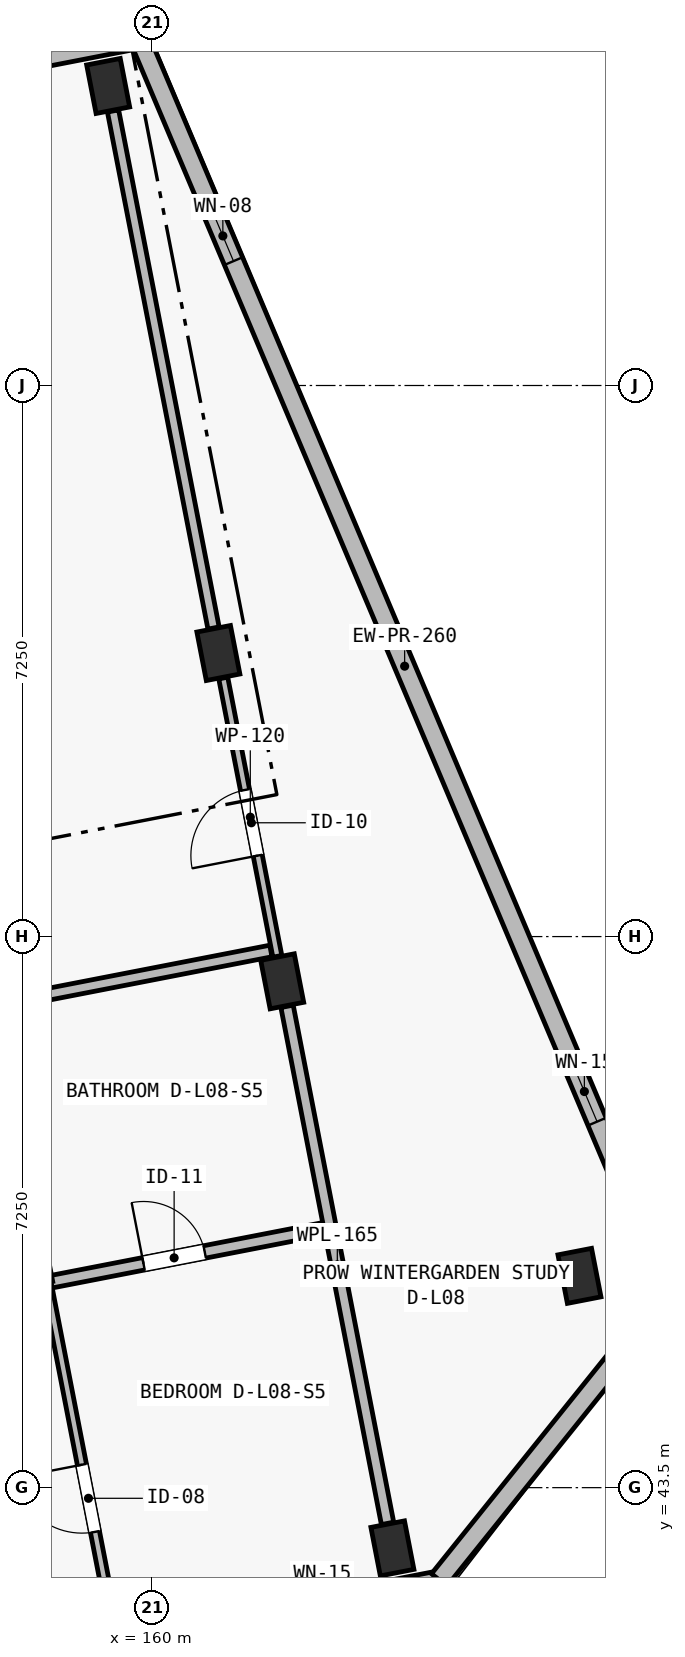
"""IFC4 building model, lengths in metres.
Left out: names, types, materials, properties, quantities, classifications, styles, units other than length and angle.
Written with IfcOpenShell. Run it as: python <this file> out.ifc"""

import sys

from ifc_helpers import new_model, si_unit, direction, frame, frame_2d, origin, origin_2d, place, context, subcontext, project, spatial, polyline, rectangle, outline, extrude, element, fill, save


model = new_model("IFC4")
c1 = context("Model", 3, precision=1e-05, world=origin(), true_north=direction((0.0, 1.0)))
c2 = subcontext(c1, "Body", "Model", "MODEL_VIEW")
j1 = project(units=[si_unit("LENGTHUNIT", "METRE"), si_unit("PLANEANGLEUNIT", "RADIAN")], contexts=[c1])
p1 = place(None, origin())
s1 = spatial("IfcSite", under=j1, at=p1, CompositionType="ELEMENT")
p2 = place(p1, origin())
s2 = spatial("IfcBuilding", under=s1, at=p2, CompositionType="ELEMENT")
p3 = place(p2, frame((0.0, 0.0, 27.9)))
s3 = spatial("IfcBuildingStorey", under=s2, at=p3, CompositionType="ELEMENT", Elevation=27.9)
for number, where, z_axis, x_axis in (
    (1, (163.162, 42.701, 0.0), (0.0, 0.0, 1.0), (0.982, 0.191, 0.0)),
    (2, (161.712, 50.161, 0.0), (0.0, 0.0, 1.0), (0.982, 0.191, 0.0)),
    (3, (160.873, 54.48, 0.0), (0.0, 0.0, 1.0), (0.982, 0.191, 0.0)),
    (4, (159.422, 61.941, 0.0), (0.0, 0.0, 1.0), (0.982, 0.191, 0.0)),
):
    element("IfcColumn", number, at=place(p3, frame(where, z_axis=z_axis, x_axis=x_axis)), inside=s3, PredefinedType="COLUMN", context=c2, shape_type="SweptSolid", body=[
        extrude(rectangle(XDim=0.45, YDim=0.65, at=origin_2d()), origin(), (0.0, 0.0, 1.0), 7.468),
    ])
p4 = place(p3, frame((165.623, 46.286, 0.0), z_axis=(0.0, 0.0, 1.0), x_axis=(0.981627183448, 0.190808995377, 0.0)))
e5 = element("IfcColumn", 5, at=p4, inside=s3, PredefinedType="COLUMN", context=c2, shape_type="SweptSolid", body=[
    extrude(rectangle(XDim=0.45, YDim=0.65, at=origin_2d()), origin(), (0.0, 0.0, 1.0), 8.139),
])
p5 = place(p3, frame((163.778, 42.286, 0.0), z_axis=(0.0, 0.0, 1.0), x_axis=(-0.981628367112, -0.190802905848, 0.0)))
e6 = element("IfcWall", 6, at=p5, inside=s3, PredefinedType="SOLIDWALL", context=c2, shape_type="SweptSolid", body=[
    extrude(outline(polyline([(0.0, 0.0), (8.125, 0.0), (8.125, 6.56), (0.0, 8.241), (0.0, 0.0)])), frame((0.0, 0.12, 0.0), z_axis=(0.0, -1.0, 0.0), x_axis=(1.0, 0.0, 0.0)), (0.0, 0.0, 1.0), 0.24),
])
p6 = place(p5, frame((1.135, 0.0, 0.48)))
e7 = element("IfcOpeningElement", 7, at=p6, cuts=e6, PredefinedType="OPENING", context=c2, shape_type="SweptSolid", body=[
    extrude(rectangle(XDim=0.86, YDim=2.36, at=frame_2d((0.43, 1.18))), frame((0.0, 0.135, 0.0), z_axis=(0.0, -1.0, 0.0), x_axis=(1.0, 0.0, 0.0)), (0.0, 0.0, 1.0), 0.27),
])
p7 = place(p5, frame((2.697, 0.0, 0.52)))
e8 = element("IfcOpeningElement", 8, at=p7, cuts=e6, PredefinedType="OPENING", context=c2, shape_type="SweptSolid", body=[
    extrude(rectangle(XDim=0.58, YDim=2.16, at=frame_2d((0.29, 1.08))), frame((0.0, 0.135, 0.0), z_axis=(0.0, -1.0, 0.0), x_axis=(1.0, 0.0, 0.0)), (0.0, 0.0, 1.0), 0.27),
])
p8 = place(p5, frame((6.43, 0.0, 0.48)))
e9 = element("IfcOpeningElement", 9, at=p8, cuts=e6, PredefinedType="OPENING", context=c2, shape_type="SweptSolid", body=[
    extrude(rectangle(XDim=0.62, YDim=2.28, at=frame_2d((0.31, 1.14))), frame((0.0, 0.135, 0.0), z_axis=(0.0, -1.0, 0.0), x_axis=(1.0, 0.0, 0.0)), (0.0, 0.0, 1.0), 0.27),
])
p9 = place(p3, frame((151.862, 61.006, 0.0), z_axis=(0.0, 0.0, 1.0), x_axis=(0.981627273155, 0.190808533872, 0.0)))
e10 = element("IfcWall", 10, at=p9, inside=s3, PredefinedType="SOLIDWALL", context=c2, shape_type="SweptSolid", body=[
    extrude(outline(polyline([(0.0, 0.0), (8.125, 0.0), (8.125, 8.241), (0.0, 6.56), (0.0, 0.0)])), frame((0.0, 0.12, 0.0), z_axis=(0.0, -1.0, 0.0), x_axis=(1.0, 0.0, 0.0)), (0.0, 0.0, 1.0), 0.24),
])
p10 = place(p3, frame((159.837, 62.556, 0.0), z_axis=(0.0, 0.0, 1.0), x_axis=(0.389225507936, -0.921142499276, 0.0)))
e11 = element("IfcWall", 11, at=p10, inside=s3, PredefinedType="SOLIDWALL", context=c2, shape_type="SweptSolid", body=[
    extrude(outline(polyline([(0.0, 0.0), (17.91, 0.0), (17.91, 9.006), (0.0, 8.241), (0.0, 0.0)])), frame((0.0, 0.13, 0.0), z_axis=(0.0, -1.0, 0.0), x_axis=(1.0, 0.0, 0.0)), (0.0, 0.0, 1.0), 0.26),
])
p11 = place(p10, frame((2.45, 0.0, 0.45)))
e12 = element("IfcOpeningElement", 12, at=p11, cuts=e11, PredefinedType="OPENING", context=c2, shape_type="SweptSolid", body=[
    extrude(rectangle(XDim=0.72, YDim=2.16, at=frame_2d((0.36, 1.08))), frame((0.0, 0.145, 0.0), z_axis=(0.0, -1.0, 0.0), x_axis=(1.0, 0.0, 0.0)), (0.0, 0.0, 1.0), 0.29),
])
p12 = place(p10, frame((14.6, 0.0, 0.52)))
e13 = element("IfcOpeningElement", 13, at=p12, cuts=e11, PredefinedType="OPENING", context=c2, shape_type="SweptSolid", body=[
    extrude(rectangle(XDim=0.86, YDim=2.36, at=frame_2d((0.43, 1.18))), frame((0.0, 0.145, 0.0), z_axis=(0.0, -1.0, 0.0), x_axis=(1.0, 0.0, 0.0)), (0.0, 0.0, 1.0), 0.29),
])
p13 = place(p3, frame((166.809, 46.058, 0.0), z_axis=(0.0, 0.0, 1.0), x_axis=(-0.626281072923, -0.779597343312, 0.0)))
e14 = element("IfcWall", 14, at=p13, inside=s3, PredefinedType="SOLIDWALL", context=c2, shape_type="SweptSolid", body=[
    extrude(outline(polyline([(0.0, 0.0), (4.839, 0.0), (4.839, 8.241), (0.0, 9.006), (0.0, 0.0)])), frame((0.0, 0.13, 0.0), z_axis=(0.0, -1.0, 0.0), x_axis=(1.0, 0.0, 0.0)), (0.0, 0.0, 1.0), 0.26),
])
p14 = place(p3, frame((161.648, 50.49, 0.0), z_axis=(0.0, 0.0, 1.0), x_axis=(-0.190789073686, 0.981631055622, 0.0)))
e15 = element("IfcWall", 15, at=p14, inside=s3, PredefinedType="PARTITIONING", context=c2, shape_type="SweptSolid", body=[
    extrude(rectangle(XDim=3.73, YDim=0.12, at=frame_2d((1.865, 0.0))), origin(), (0.0, 0.0, 1.0), 2.6),
])
p15 = place(p14, frame((1.35, 0.0, 0.0)))
e16 = element("IfcOpeningElement", 16, at=p15, cuts=e15, PredefinedType="OPENING", context=c2, shape_type="SweptSolid", body=[
    extrude(rectangle(XDim=0.88, YDim=2.1, at=frame_2d((0.44, 1.05))), frame((0.0, 0.075, 0.0), z_axis=(0.0, -1.0, 0.0), x_axis=(1.0, 0.0, 0.0)), (0.0, 0.0, 1.0), 0.15),
])
p16 = place(p3, frame((160.809, 54.809, 0.0), z_axis=(0.0, 0.0, 1.0), x_axis=(-0.190808365525, 0.981627305878, 0.0)))
e17 = element("IfcWall", 17, at=p16, inside=s3, PredefinedType="PARTITIONING", context=c2, shape_type="SweptSolid", body=[
    extrude(rectangle(XDim=6.93, YDim=0.15, at=frame_2d((3.465, 0.0))), origin(), (0.0, 0.0, 1.0), 2.6),
])
p17 = place(p3, frame((163.098, 43.03, 0.0), z_axis=(0.0, 0.0, 1.0), x_axis=(-0.190835713385, 0.981621989616, 0.0)))
e18 = element("IfcWall", 18, at=p17, inside=s3, PredefinedType="PLUMBINGWALL", context=c2, shape_type="SweptSolid", body=[
    extrude(rectangle(XDim=6.93, YDim=0.165, at=frame_2d((3.465, 0.0))), origin(), (0.0, 0.0, 1.0), 2.6),
])
p18 = place(p3, frame((154.402, 49.168, 0.0), z_axis=(0.0, 0.0, 1.0), x_axis=(0.981623226858, 0.190829349137, 0.0)))
e19 = element("IfcWall", 19, at=p18, inside=s3, PredefinedType="PARTITIONING", context=c2, shape_type="SweptSolid", body=[
    extrude(rectangle(XDim=7.295, YDim=0.155, at=frame_2d((3.647, 0.0))), origin(), (0.0, 0.0, 1.0), 3.15),
])
p19 = place(p18, frame((1.355, 0.0, 0.0)))
e20 = element("IfcOpeningElement", 20, at=p19, cuts=e19, PredefinedType="OPENING", context=c2, shape_type="SweptSolid", body=[
    extrude(rectangle(XDim=0.98, YDim=2.15, at=frame_2d((0.49, 1.075))), frame((0.0, 0.093, 0.0), z_axis=(0.0, -1.0, 0.0), x_axis=(1.0, 0.0, 0.0)), (0.0, 0.0, 1.0), 0.185),
])
p20 = place(p3, frame((158.612, 46.197, 0.0), z_axis=(0.0, 0.0, 1.0), x_axis=(0.981621896267, 0.190836193549, 0.0)))
e21 = element("IfcWall", 21, at=p20, inside=s3, PredefinedType="PLUMBINGWALL", context=c2, shape_type="SweptSolid", body=[
    extrude(rectangle(XDim=3.71, YDim=0.165, at=frame_2d((1.855, 0.0))), origin(), (0.0, 0.0, 1.0), 3.15),
])
p21 = place(p20, frame((1.3, 0.0, 0.0)))
e22 = element("IfcOpeningElement", 22, at=p21, cuts=e21, PredefinedType="OPENING", context=c2, shape_type="SweptSolid", body=[
    extrude(rectangle(XDim=0.82, YDim=2.08, at=frame_2d((0.41, 1.04))), frame((0.0, 0.097, 0.0), z_axis=(0.0, -1.0, 0.0), x_axis=(1.0, 0.0, 0.0)), (0.0, 0.0, 1.0), 0.195),
])
p22 = place(p3, frame((159.506, 41.593, 0.0), z_axis=(0.0, 0.0, 1.0), x_axis=(-0.190787451574, 0.981631370893, 0.0)))
e23 = element("IfcWall", 23, at=p22, inside=s3, PredefinedType="PARTITIONING", context=c2, shape_type="SweptSolid", body=[
    extrude(rectangle(XDim=4.69, YDim=0.12, at=frame_2d((2.345, 0.0))), origin(), (0.0, 0.0, 1.0), 3.15),
])
p23 = place(p22, frame((1.35, 0.0, 0.0)))
e24 = element("IfcOpeningElement", 24, at=p23, cuts=e23, PredefinedType="OPENING", context=c2, shape_type="SweptSolid", body=[
    extrude(rectangle(XDim=0.9, YDim=2.1, at=frame_2d((0.45, 1.05))), frame((0.0, 0.075, 0.0), z_axis=(0.0, -1.0, 0.0), x_axis=(1.0, 0.0, 0.0)), (0.0, 0.0, 1.0), 0.15),
])
p24 = place(p3, frame((158.612, 46.197, 0.0), z_axis=(0.0, 0.0, 1.0), x_axis=(-0.190850336204, 0.981619146701, 0.0)))
e25 = element("IfcWall", 25, at=p24, inside=s3, PredefinedType="PLUMBINGWALL", context=c2, shape_type="SweptSolid", body=[
    extrude(rectangle(XDim=3.72, YDim=0.165, at=frame_2d((1.86, 0.0))), origin(), (0.0, 0.0, 1.0), 3.15),
])
p25 = place(p11, origin())
e26 = element("IfcWindow", 26, at=p25, inside=s3, PartitioningType="SINGLE_PANEL", PredefinedType="WINDOW", context=c2, shape_type="SweptSolid", body=[
    extrude(rectangle(XDim=0.72, YDim=2.16, at=frame_2d((0.36, 1.08))), frame((0.0, 0.03, 0.0), z_axis=(0.0, -1.0, 0.0), x_axis=(1.0, 0.0, 0.0)), (0.0, 0.0, 1.0), 0.06),
])
fill(e12, e26)
p26 = place(p12, origin())
e27 = element("IfcWindow", 27, at=p26, inside=s3, PartitioningType="SINGLE_PANEL", PredefinedType="WINDOW", context=c2, shape_type="SweptSolid", body=[
    extrude(rectangle(XDim=0.86, YDim=2.36, at=frame_2d((0.43, 1.18))), frame((0.0, 0.03, 0.0), z_axis=(0.0, -1.0, 0.0), x_axis=(1.0, 0.0, 0.0)), (0.0, 0.0, 1.0), 0.06),
])
fill(e13, e27)
p27 = place(p15, origin())
e28 = element("IfcDoor", 28, at=p27, inside=s3, OperationType="SINGLE_SWING_LEFT", PredefinedType="DOOR", context=c2, shape_type="SweptSolid", body=[
    extrude(rectangle(XDim=0.88, YDim=2.1, at=frame_2d((0.44, 1.05))), frame((0.0, 0.025, 0.0), z_axis=(0.0, -1.0, 0.0), x_axis=(1.0, 0.0, 0.0)), (0.0, 0.0, 1.0), 0.05),
])
fill(e16, e28)
p28 = place(p21, origin())
e29 = element("IfcDoor", 29, at=p28, inside=s3, OperationType="SINGLE_SWING_LEFT", PredefinedType="DOOR", context=c2, shape_type="SweptSolid", body=[
    extrude(rectangle(XDim=0.82, YDim=2.08, at=frame_2d((0.41, 1.04))), frame((0.0, 0.025, 0.0), z_axis=(0.0, -1.0, 0.0), x_axis=(1.0, 0.0, 0.0)), (0.0, 0.0, 1.0), 0.05),
])
fill(e22, e29)
p29 = place(p23, origin())
e30 = element("IfcDoor", 30, at=p29, inside=s3, OperationType="SINGLE_SWING_RIGHT", PredefinedType="DOOR", context=c2, shape_type="SweptSolid", body=[
    extrude(rectangle(XDim=0.9, YDim=2.1, at=frame_2d((0.45, 1.05))), frame((0.0, 0.025, 0.0), z_axis=(0.0, -1.0, 0.0), x_axis=(1.0, 0.0, 0.0)), (0.0, 0.0, 1.0), 0.05),
])
fill(e24, e30)
save(model, sys.argv[1])
